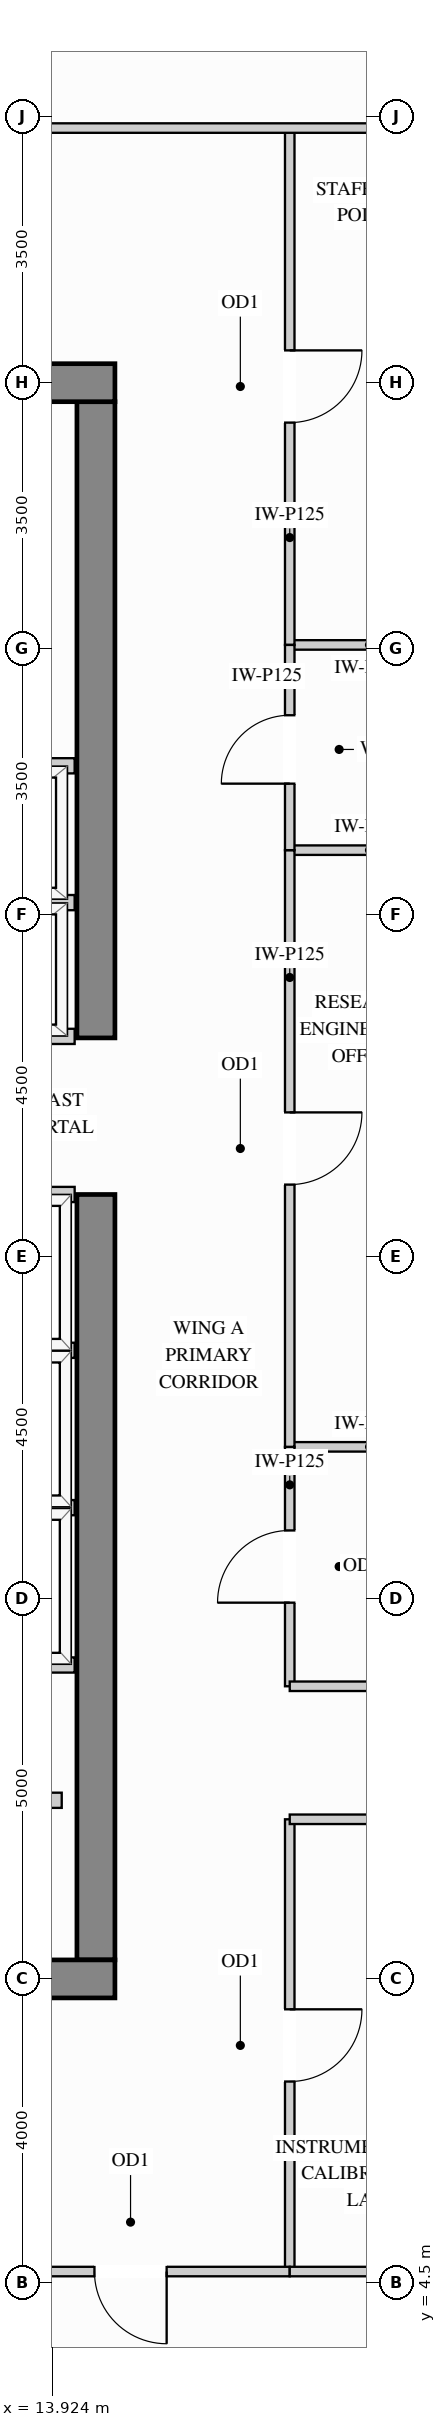
"""IFC4 building model, lengths in metres.
Left out: names, types, materials, properties, quantities, classifications, styles, units other than length and angle.
Written with IfcOpenShell. Run it as: python <this file> out.ifc"""

import sys

from ifc_helpers import new_model, si_unit, direction, frame, frame_2d, origin, place, context, subcontext, project, spatial, rectangle, extrude, source, transform, mapped, element, fill, save


model = new_model("IFC4")
c1 = context("Model", 3, precision=1e-05, world=origin(), true_north=direction((0.0, 1.0)))
c2 = subcontext(c1, "Body", "Model", "MODEL_VIEW")
j1 = project(units=[si_unit("LENGTHUNIT", "METRE"), si_unit("PLANEANGLEUNIT", "RADIAN")], contexts=[c1])
p1 = place(None, origin())
s1 = spatial("IfcSite", under=j1, at=p1, CompositionType="ELEMENT")
p2 = place(p1, origin())
s2 = spatial("IfcBuilding", under=s1, at=p2, CompositionType="ELEMENT")
p3 = place(p2, frame((0.0, 0.0, 252.0)))
s3 = spatial("IfcBuildingStorey", under=s2, at=p3, CompositionType="ELEMENT", Elevation=252.0)
m1 = source(origin(), c2, "Body", "SweptSolid", [
    extrude(rectangle(XDim=10.07, YDim=0.5, at=frame_2d((5.035, 0.0))), origin(), (0.0, 0.0, 1.0), 3.4),
])
p4 = place(p3, frame((14.5, 8.75, 0.0), z_axis=(0.0, 0.0, 1.0), x_axis=(0.0, 1.0, 0.0)))
e1 = element("IfcWall", 1, at=p4, inside=s3, PredefinedType="SHEAR", context=c2, shape_type="MappedRepresentation", body=[
    mapped(m1, transform((0.0, 0.0, 0.0), x_axis=(1.0, 0.0, 0.0), y_axis=(0.0, 1.0, 0.0), z_axis=(0.0, 0.0, 1.0))),
])
m2 = source(origin(), c2, "Body", "SweptSolid", [
    extrude(rectangle(XDim=8.37, YDim=0.5, at=frame_2d((4.185, 0.0))), origin(), (0.0, 0.0, 1.0), 3.4),
])
p5 = place(p3, frame((14.5, 20.88, 0.0), z_axis=(0.0, 0.0, 1.0), x_axis=(0.0, 1.0, 0.0)))
e2 = element("IfcWall", 2, at=p5, inside=s3, PredefinedType="SHEAR", context=c2, shape_type="MappedRepresentation", body=[
    mapped(m2, transform((0.0, 0.0, 0.0), x_axis=(1.0, 0.0, 0.0), y_axis=(0.0, 1.0, 0.0), z_axis=(0.0, 0.0, 1.0))),
])
m3 = source(origin(), c2, "Body", "SweptSolid", [
    extrude(rectangle(XDim=10.5, YDim=0.5, at=frame_2d((5.25, 0.0))), origin(), (0.0, 0.0, 1.0), 3.4),
])
for number, where, z_axis, x_axis in (
    (3, (4.25, 29.5, 0.0), (0.0, 0.0, 1.0), (1.0, 0.0, 0.0)),
    (4, (4.25, 8.5, 0.0), (0.0, 0.0, 1.0), (1.0, 0.0, 0.0)),
):
    element("IfcWall", number, at=place(p3, frame(where, z_axis=z_axis, x_axis=x_axis)), inside=s3, PredefinedType="SHEAR", context=c2, shape_type="MappedRepresentation", body=[
        mapped(m3, transform((0.0, 0.0, 0.0), x_axis=(1.0, 0.0, 0.0), y_axis=(0.0, 1.0, 0.0), z_axis=(0.0, 0.0, 1.0))),
    ])
m4 = source(origin(), c2, "Body", "SweptSolid", [
    extrude(rectangle(XDim=2.1, YDim=0.125, at=frame_2d((1.05, 0.0))), origin(), (0.0, 0.0, 1.0), 3.385),
])
p6 = place(p3, frame((17.05, 15.5, 0.0), z_axis=(0.0, 0.0, 1.0), x_axis=(1.0, 0.0, 0.0)))
e5 = element("IfcWall", 5, at=p6, inside=s3, PredefinedType="PARTITIONING", context=c2, shape_type="MappedRepresentation", body=[
    mapped(m4, transform((0.0, 0.0, 0.0), x_axis=(1.0, 0.0, 0.0), y_axis=(0.0, 1.0, 0.0), z_axis=(0.0, 0.0, 1.0))),
])
m5 = source(origin(), c2, "Body", "SweptSolid", [
    extrude(rectangle(XDim=2.098, YDim=0.125, at=frame_2d((1.049, 0.0))), origin(), (0.0, 0.0, 1.0), 3.385),
])
for number, where, z_axis, x_axis in (
    (6, (17.05, 23.35, 0.0), (0.0, 0.0, 1.0), (1.0, 0.0, 0.0)),
    (7, (17.05, 26.05, 0.0), (0.0, 0.0, 1.0), (1.0, 0.0, 0.0)),
):
    element("IfcWall", number, at=place(p3, frame(where, z_axis=z_axis, x_axis=x_axis)), inside=s3, PredefinedType="PARTITIONING", context=c2, shape_type="MappedRepresentation", body=[
        mapped(m5, transform((0.0, 0.0, 0.0), x_axis=(1.0, 0.0, 0.0), y_axis=(0.0, 1.0, 0.0), z_axis=(0.0, 0.0, 1.0))),
    ])
p7 = place(p3, frame((17.05, 12.35, 0.0), z_axis=(0.0, 0.0, 1.0), x_axis=(0.0, 1.0, 0.0)))
e8 = element("IfcWall", 8, at=p7, inside=s3, PredefinedType="PARTITIONING", context=c2, shape_type="SweptSolid", body=[
    extrude(rectangle(XDim=3.15, YDim=0.125, at=frame_2d((1.575, 0.0))), origin(), (0.0, 0.0, 1.0), 3.385),
])
p8 = place(p7, frame((1.1, 0.0, 0.0)))
e9 = element("IfcOpeningElement", 9, at=p8, cuts=e8, PredefinedType="OPENING", context=c2, shape_type="SweptSolid", body=[
    extrude(rectangle(XDim=0.95, YDim=2.15, at=frame_2d((0.475, 1.075))), frame((0.0, 0.073, 0.0), z_axis=(0.0, -1.0, 0.0), x_axis=(1.0, 0.0, 0.0)), (0.0, 0.0, 1.0), 0.145),
])
p9 = place(p3, frame((17.05, 15.5, 0.0), z_axis=(0.0, 0.0, 1.0), x_axis=(0.0, 1.0, 0.0)))
e10 = element("IfcWall", 10, at=p9, inside=s3, PredefinedType="PARTITIONING", context=c2, shape_type="SweptSolid", body=[
    extrude(rectangle(XDim=7.85, YDim=0.125, at=frame_2d((3.925, 0.0))), origin(), (0.0, 0.0, 1.0), 3.385),
])
p10 = place(p9, frame((3.45, 0.0, 0.0)))
e11 = element("IfcOpeningElement", 11, at=p10, cuts=e10, PredefinedType="OPENING", context=c2, shape_type="SweptSolid", body=[
    extrude(rectangle(XDim=0.95, YDim=2.15, at=frame_2d((0.475, 1.075))), frame((0.0, 0.073, 0.0), z_axis=(0.0, -1.0, 0.0), x_axis=(1.0, 0.0, 0.0)), (0.0, 0.0, 1.0), 0.145),
])
p11 = place(p3, frame((17.05, 26.05, 0.0), z_axis=(0.0, 0.0, 1.0), x_axis=(0.0, 1.0, 0.0)))
e12 = element("IfcWall", 12, at=p11, inside=s3, PredefinedType="PARTITIONING", context=c2, shape_type="SweptSolid", body=[
    extrude(rectangle(XDim=6.8, YDim=0.125, at=frame_2d((3.4, 0.0))), origin(), (0.0, 0.0, 1.0), 3.385),
])
p12 = place(p11, frame((2.925, 0.0, 0.0)))
e13 = element("IfcOpeningElement", 13, at=p12, cuts=e12, PredefinedType="OPENING", context=c2, shape_type="SweptSolid", body=[
    extrude(rectangle(XDim=0.95, YDim=2.15, at=frame_2d((0.475, 1.075))), frame((0.0, 0.073, 0.0), z_axis=(0.0, -1.0, 0.0), x_axis=(1.0, 0.0, 0.0)), (0.0, 0.0, 1.0), 0.145),
])
p13 = place(p3, frame((17.05, 4.65, 0.0), z_axis=(0.0, 0.0, 1.0), x_axis=(0.0, 1.0, 0.0)))
e14 = element("IfcWall", 14, at=p13, inside=s3, PredefinedType="PARTITIONING", context=c2, shape_type="SweptSolid", body=[
    extrude(rectangle(XDim=5.95, YDim=0.125, at=frame_2d((2.975, 0.0))), origin(), (0.0, 0.0, 1.0), 3.385),
])
p14 = place(p13, frame((2.5, 0.0, 0.0)))
e15 = element("IfcOpeningElement", 15, at=p14, cuts=e14, PredefinedType="OPENING", context=c2, shape_type="SweptSolid", body=[
    extrude(rectangle(XDim=0.95, YDim=2.15, at=frame_2d((0.475, 1.075))), frame((0.0, 0.073, 0.0), z_axis=(0.0, -1.0, 0.0), x_axis=(1.0, 0.0, 0.0)), (0.0, 0.0, 1.0), 0.145),
])
p15 = place(p3, frame((17.05, 23.35, 0.0), z_axis=(0.0, 0.0, 1.0), x_axis=(0.0, 1.0, 0.0)))
e16 = element("IfcWall", 16, at=p15, inside=s3, PredefinedType="PARTITIONING", context=c2, shape_type="SweptSolid", body=[
    extrude(rectangle(XDim=2.7, YDim=0.125, at=frame_2d((1.35, 0.0))), origin(), (0.0, 0.0, 1.0), 3.385),
])
p16 = place(p15, frame((0.875, 0.0, 0.0)))
e17 = element("IfcOpeningElement", 17, at=p16, cuts=e16, PredefinedType="OPENING", context=c2, shape_type="SweptSolid", body=[
    extrude(rectangle(XDim=0.9, YDim=2.15, at=frame_2d((0.45, 1.075))), frame((0.0, 0.073, 0.0), z_axis=(0.0, -1.0, 0.0), x_axis=(1.0, 0.0, 0.0)), (0.0, 0.0, 1.0), 0.145),
])
m6 = source(origin(), c2, "Body", "SweptSolid", [
    extrude(rectangle(XDim=12.598, YDim=0.125, at=frame_2d((6.299, 0.0))), origin(), (0.0, 0.0, 1.0), 3.385),
])
p17 = place(p3, frame((6.55, 32.85, 0.0), z_axis=(0.0, 0.0, 1.0), x_axis=(1.0, 0.0, 0.0)))
e18 = element("IfcWall", 18, at=p17, inside=s3, PredefinedType="PARTITIONING", context=c2, shape_type="MappedRepresentation", body=[
    mapped(m6, transform((0.0, 0.0, 0.0), x_axis=(1.0, 0.0, 0.0), y_axis=(0.0, 1.0, 0.0), z_axis=(0.0, 0.0, 1.0))),
])
m7 = source(origin(), c2, "Body", "SweptSolid", [
    extrude(rectangle(XDim=2.45, YDim=0.125, at=frame_2d((1.225, 0.0))), origin(), (0.0, 0.0, 1.0), 3.385),
])
for number, where, z_axis, x_axis in (
    (19, (17.05, 12.35, 0.0), (0.0, 0.0, 1.0), (1.0, 0.0, 0.0)),
    (20, (17.05, 10.6, 0.0), (0.0, 0.0, 1.0), (1.0, 0.0, 0.0)),
):
    element("IfcWall", number, at=place(p3, frame(where, z_axis=z_axis, x_axis=x_axis)), inside=s3, PredefinedType="PARTITIONING", context=c2, shape_type="MappedRepresentation", body=[
        mapped(m7, transform((0.0, 0.0, 0.0), x_axis=(1.0, 0.0, 0.0), y_axis=(0.0, 1.0, 0.0), z_axis=(0.0, 0.0, 1.0))),
    ])
p18 = place(p3, frame((12.861, 4.65, 0.0), z_axis=(0.0, 0.0, 1.0), x_axis=(1.0, 0.0, 0.0)))
e21 = element("IfcWall", 21, at=p18, inside=s3, PredefinedType="PARTITIONING", context=c2, shape_type="SweptSolid", body=[
    extrude(rectangle(XDim=4.189, YDim=0.125, at=frame_2d((2.094, 0.0))), origin(), (0.0, 0.0, 1.0), 2.848),
])
p19 = place(p18, frame((1.619, 0.0, 0.0)))
e22 = element("IfcOpeningElement", 22, at=p19, cuts=e21, PredefinedType="OPENING", context=c2, shape_type="SweptSolid", body=[
    extrude(rectangle(XDim=0.95, YDim=2.15, at=frame_2d((0.475, 1.075))), frame((0.0, 0.073, 0.0), z_axis=(0.0, -1.0, 0.0), x_axis=(1.0, 0.0, 0.0)), (0.0, 0.0, 1.0), 0.145),
])
m8 = source(origin(), c2, "Body", "SweptSolid", [
    extrude(rectangle(XDim=2.1, YDim=0.125, at=frame_2d((1.05, 0.0))), origin(), (0.0, 0.0, 1.0), 2.848),
])
p20 = place(p3, frame((17.05, 4.65, 0.0), z_axis=(0.0, 0.0, 1.0), x_axis=(1.0, 0.0, 0.0)))
e23 = element("IfcWall", 23, at=p20, inside=s3, PredefinedType="PARTITIONING", context=c2, shape_type="MappedRepresentation", body=[
    mapped(m8, transform((0.0, 0.0, 0.0), x_axis=(1.0, 0.0, 0.0), y_axis=(0.0, 1.0, 0.0), z_axis=(0.0, 0.0, 1.0))),
])
m9 = source(origin(), c2, "Body", "SweptSolid", [
    extrude(rectangle(XDim=1.63, YDim=0.2, at=frame_2d((0.815, 0.0))), origin(), (0.0, 0.0, 1.0), 3.385),
])
p21 = place(p3, frame((12.42, 10.85, 0.0), z_axis=(0.0, 0.0, 1.0), x_axis=(1.0, 0.0, 0.0)))
e24 = element("IfcWall", 24, at=p21, inside=s3, PredefinedType="PARTITIONING", context=c2, shape_type="MappedRepresentation", body=[
    mapped(m9, transform((0.0, 0.0, 0.0), x_axis=(1.0, 0.0, 0.0), y_axis=(0.0, 1.0, 0.0), z_axis=(0.0, 0.0, 1.0))),
])
m10 = source(origin(), c2, "Body", "SweptSolid", [
    extrude(rectangle(XDim=2.39, YDim=0.2, at=frame_2d((1.195, 0.0))), origin(), (0.0, 0.0, 1.0), 3.385),
])
for number, where, z_axis, x_axis in (
    (25, (11.83, 22.66, 0.0), (0.0, 0.0, 1.0), (1.0, 0.0, 0.0)),
    (26, (11.83, 20.9, 0.0), (0.0, 0.0, 1.0), (1.0, 0.0, 0.0)),
    (27, (11.83, 24.46, 0.0), (0.0, 0.0, 1.0), (1.0, 0.0, 0.0)),
):
    element("IfcWall", number, at=place(p3, frame(where, z_axis=z_axis, x_axis=x_axis)), inside=s3, PredefinedType="PARTITIONING", context=c2, shape_type="MappedRepresentation", body=[
        mapped(m10, transform((0.0, 0.0, 0.0), x_axis=(1.0, 0.0, 0.0), y_axis=(0.0, 1.0, 0.0), z_axis=(0.0, 0.0, 1.0))),
    ])
m11 = source(origin(), c2, "Body", "SweptSolid", [
    extrude(rectangle(XDim=1.99, YDim=0.2, at=frame_2d((0.995, 0.0))), origin(), (0.0, 0.0, 1.0), 3.385),
])
for number, where, z_axis, x_axis in (
    (28, (12.23, 14.7, 0.0), (0.0, 0.0, 1.0), (1.0, 0.0, 0.0)),
    (29, (12.23, 12.63, 0.0), (0.0, 0.0, 1.0), (1.0, 0.0, 0.0)),
    (30, (12.23, 16.77, 0.0), (0.0, 0.0, 1.0), (1.0, 0.0, 0.0)),
    (31, (12.23, 18.82, 0.0), (0.0, 0.0, 1.0), (1.0, 0.0, 0.0)),
):
    element("IfcWall", number, at=place(p3, frame(where, z_axis=z_axis, x_axis=x_axis)), inside=s3, PredefinedType="PARTITIONING", context=c2, shape_type="MappedRepresentation", body=[
        mapped(m11, transform((0.0, 0.0, 0.0), x_axis=(1.0, 0.0, 0.0), y_axis=(0.0, 1.0, 0.0), z_axis=(0.0, 0.0, 1.0))),
    ])
m12 = source(origin(), c2, "Body", "SweptSolid", [
    extrude(rectangle(XDim=0.95, YDim=2.15, at=frame_2d((0.475, 1.075))), frame((0.0, 0.025, 0.0), z_axis=(0.0, -1.0, 0.0), x_axis=(1.0, 0.0, 0.0)), (0.0, 0.0, 1.0), 0.05),
])
p22 = place(p14, origin())
e32 = element("IfcDoor", 32, at=p22, inside=s3, OperationType="SINGLE_SWING_RIGHT", PredefinedType="DOOR", context=c2, shape_type="MappedRepresentation", body=[
    mapped(m12, transform((0.0, 0.0, 0.0), x_axis=(1.0, 0.0, 0.0), y_axis=(0.0, 1.0, 0.0), z_axis=(0.0, 0.0, 1.0))),
])
fill(e15, e32)
p23 = place(p8, origin())
e33 = element("IfcDoor", 33, at=p23, inside=s3, OperationType="SINGLE_SWING_LEFT", PredefinedType="DOOR", context=c2, shape_type="MappedRepresentation", body=[
    mapped(m12, transform((0.0, 0.0, 0.0), x_axis=(1.0, 0.0, 0.0), y_axis=(0.0, 1.0, 0.0), z_axis=(0.0, 0.0, 1.0))),
])
fill(e9, e33)
p24 = place(p10, origin())
e34 = element("IfcDoor", 34, at=p24, inside=s3, OperationType="SINGLE_SWING_RIGHT", PredefinedType="DOOR", context=c2, shape_type="MappedRepresentation", body=[
    mapped(m12, transform((0.0, 0.0, 0.0), x_axis=(1.0, 0.0, 0.0), y_axis=(0.0, 1.0, 0.0), z_axis=(0.0, 0.0, 1.0))),
])
fill(e11, e34)
p25 = place(p12, origin())
e35 = element("IfcDoor", 35, at=p25, inside=s3, OperationType="SINGLE_SWING_RIGHT", PredefinedType="DOOR", context=c2, shape_type="MappedRepresentation", body=[
    mapped(m12, transform((0.0, 0.0, 0.0), x_axis=(1.0, 0.0, 0.0), y_axis=(0.0, 1.0, 0.0), z_axis=(0.0, 0.0, 1.0))),
])
fill(e13, e35)
p26 = place(p19, origin())
e36 = element("IfcDoor", 36, at=p26, inside=s3, OperationType="SINGLE_SWING_RIGHT", PredefinedType="DOOR", context=c2, shape_type="MappedRepresentation", body=[
    mapped(m12, transform((0.0, 0.0, 0.0), x_axis=(1.0, 0.0, 0.0), y_axis=(0.0, 1.0, 0.0), z_axis=(0.0, 0.0, 1.0))),
])
fill(e22, e36)
m13 = source(origin(), c2, "Body", "SweptSolid", [
    extrude(rectangle(XDim=0.9, YDim=2.15, at=frame_2d((0.45, 1.075))), frame((0.0, 0.025, 0.0), z_axis=(0.0, -1.0, 0.0), x_axis=(1.0, 0.0, 0.0)), (0.0, 0.0, 1.0), 0.05),
])
p27 = place(p16, origin())
e37 = element("IfcDoor", 37, at=p27, inside=s3, OperationType="SINGLE_SWING_LEFT", PredefinedType="DOOR", context=c2, shape_type="MappedRepresentation", body=[
    mapped(m13, transform((0.0, 0.0, 0.0), x_axis=(1.0, 0.0, 0.0), y_axis=(0.0, 1.0, 0.0), z_axis=(0.0, 0.0, 1.0))),
])
fill(e17, e37)
save(model, sys.argv[1])
